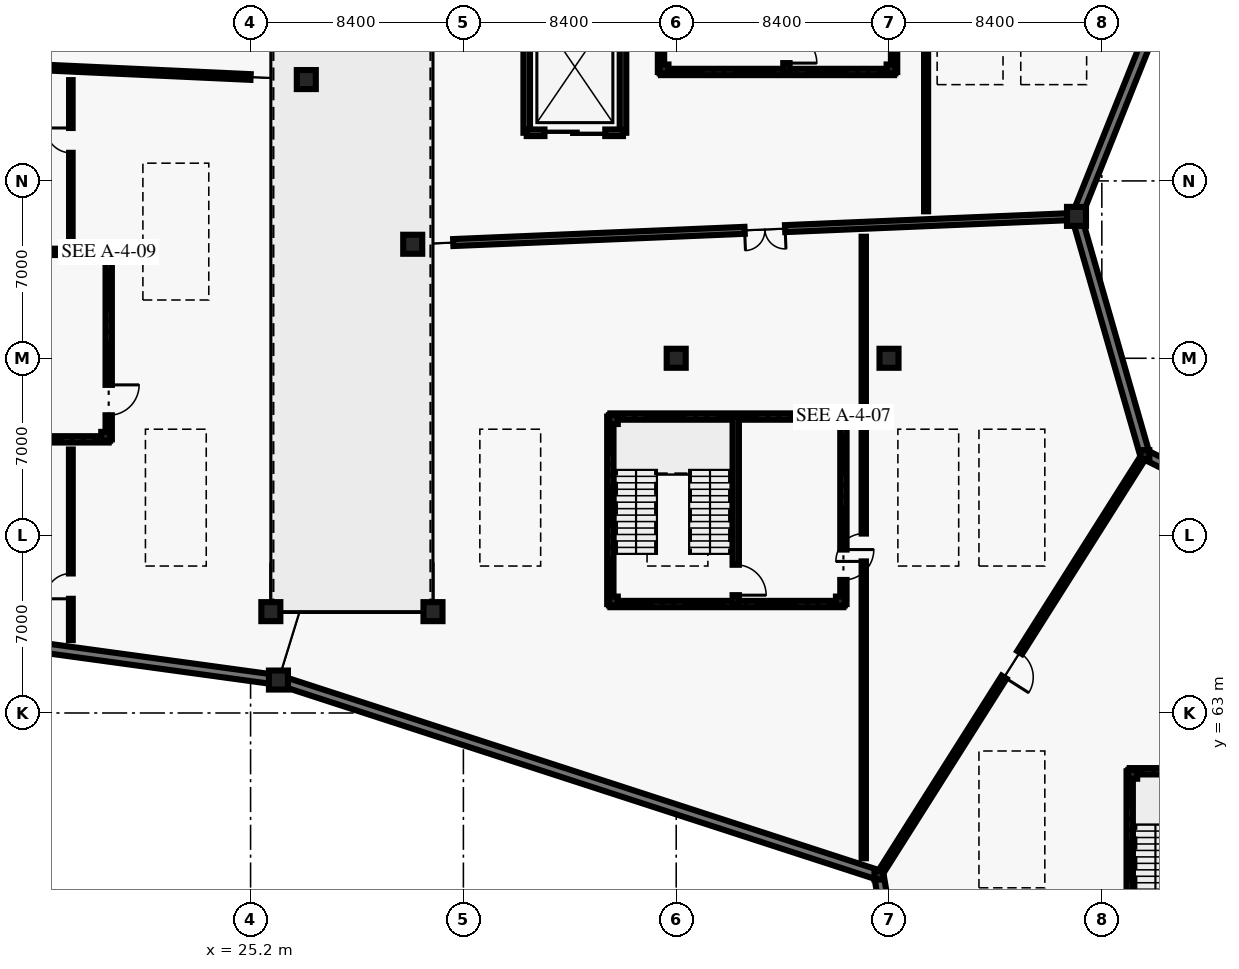
"""IFC4 building model, lengths in metres.
Left out: names, types, materials, properties, quantities, classifications, styles, units other than length and angle.
Written with IfcOpenShell. Run it as: python <this file> out.ifc"""

import sys

from ifc_helpers import new_model, si_unit, direction, frame, frame_2d, origin, origin_2d, place, context, subcontext, project, spatial, rectangle, i_section, extrude, element, fill, save


model = new_model("IFC4")
c1 = context("Model", 3, precision=1e-05, world=origin(), true_north=direction((0.0, 1.0)))
c2 = subcontext(c1, "Body", "Model", "MODEL_VIEW")
j1 = project(units=[si_unit("LENGTHUNIT", "METRE"), si_unit("PLANEANGLEUNIT", "RADIAN")], contexts=[c1])
p1 = place(None, origin())
s1 = spatial("IfcSite", under=j1, at=p1, CompositionType="ELEMENT")
p2 = place(p1, origin())
s2 = spatial("IfcBuilding", under=s1, at=p2, CompositionType="ELEMENT")
p3 = place(p2, frame((0.0, 0.0, -4.5)))
s3 = spatial("IfcBuildingStorey", under=s2, at=p3, CompositionType="ELEMENT", Elevation=-4.5)
for number, where, z_axis, x_axis in (
    (1, (26.3, 64.3, 0.0), (0.0, 0.0, 1.0), (1.0, 0.0, 0.0)),
    (2, (27.4, 88.0, 0.0), (0.0, 0.0, 1.0), (1.0, 0.0, 0.0)),
    (3, (31.6, 81.5, 0.0), (0.0, 0.0, 1.0), (1.0, 0.0, 0.0)),
):
    element("IfcColumn", number, at=place(p3, frame(where, z_axis=z_axis, x_axis=x_axis)), inside=s3, PredefinedType="COLUMN", context=c2, shape_type="SweptSolid", body=[
        extrude(rectangle(XDim=0.75, YDim=0.75, at=origin_2d()), origin(), (0.0, 0.0, 1.0), 4.5),
    ])
p4 = place(p3, frame((50.0, 56.6, 0.0), z_axis=(0.0, 0.0, 1.0), x_axis=(1.0, 0.0, 0.0)))
e4 = element("IfcColumn", 4, at=p4, inside=s3, PredefinedType="COLUMN", context=c2, shape_type="SweptSolid", body=[
    extrude(i_section(OverallWidth=0.35, OverallDepth=0.35, WebThickness=0.02, FlangeThickness=0.028, at=origin_2d()), origin(), (0.0, 0.0, 1.0), 4.5),
])
p5 = place(p3, frame((57.8, 82.6, 0.0), z_axis=(0.0, 0.0, 1.0), x_axis=(1.0, 0.0, 0.0)))
e5 = element("IfcColumn", 5, at=p5, inside=s3, PredefinedType="COLUMN", context=c2, shape_type="SweptSolid", body=[
    extrude(rectangle(XDim=0.75, YDim=0.75, at=origin_2d()), origin(), (0.0, 0.0, 1.0), 4.5),
])
p6 = place(p3, frame((60.5, 73.2, 0.0), z_axis=(0.0, 0.0, 1.0), x_axis=(1.0, 0.0, 0.0)))
e6 = element("IfcColumn", 6, at=p6, inside=s3, PredefinedType="COLUMN", context=c2, shape_type="SweptSolid", body=[
    extrude(i_section(OverallWidth=0.35, OverallDepth=0.35, WebThickness=0.02, FlangeThickness=0.028, at=origin_2d()), origin(), (0.0, 0.0, 1.0), 4.5),
])
for number, where, z_axis, x_axis in (
    (7, (42.0, 77.0, 0.0), (0.0, 0.0, 1.0), (1.0, 0.0, 0.0)),
    (8, (50.4, 77.0, 0.0), (0.0, 0.0, 1.0), (1.0, 0.0, 0.0)),
    (9, (26.0, 67.0, 0.0), (0.0, 0.0, 1.0), (1.0, 0.0, 0.0)),
    (10, (32.4, 67.0, 0.0), (0.0, 0.0, 1.0), (1.0, 0.0, 0.0)),
):
    element("IfcColumn", number, at=place(p3, frame(where, z_axis=z_axis, x_axis=x_axis)), inside=s3, PredefinedType="COLUMN", context=c2, shape_type="SweptSolid", body=[
        extrude(rectangle(XDim=0.75, YDim=0.75, at=origin_2d()), origin(), (0.0, 0.0, 1.0), 4.5),
    ])
for number, where, z_axis, x_axis in (
    (11, (60.02, 60.58, 0.0), (0.0, 0.0, 1.0), (1.0, 0.0, 0.0)),
    (12, (39.52, 67.42, 0.0), (0.0, 0.0, 1.0), (1.0, 0.0, 0.0)),
    (13, (48.48, 67.42, 0.0), (0.0, 0.0, 1.0), (1.0, 0.0, 0.0)),
    (14, (48.48, 74.58, 0.0), (0.0, 0.0, 1.0), (1.0, 0.0, 0.0)),
    (15, (39.52, 74.58, 0.0), (0.0, 0.0, 1.0), (1.0, 0.0, 0.0)),
    (16, (19.48, 73.92, 0.0), (0.0, 0.0, 1.0), (1.0, 0.0, 0.0)),
    (17, (19.48, 81.08, 0.0), (0.0, 0.0, 1.0), (1.0, 0.0, 0.0)),
    (18, (41.52, 88.42, 0.0), (0.0, 0.0, 1.0), (1.0, 0.0, 0.0)),
    (19, (50.48, 88.42, 0.0), (0.0, 0.0, 1.0), (1.0, 0.0, 0.0)),
):
    element("IfcColumn", number, at=place(p3, frame(where, z_axis=z_axis, x_axis=x_axis)), inside=s3, PredefinedType="COLUMN", context=c2, shape_type="SweptSolid", body=[
        extrude(i_section(OverallWidth=0.35, OverallDepth=0.35, WebThickness=0.02, FlangeThickness=0.028, at=origin_2d()), origin(), (0.0, 0.0, 1.0), 4.5),
    ])
p7 = place(p3, frame((50.008, 56.551, 0.0), z_axis=(0.0, 0.0, 1.0), x_axis=(0.164415392621, -0.986391189473, 0.0)))
e20 = element("IfcWall", 20, at=p7, inside=s3, PredefinedType="USERDEFINED", context=c2, shape_type="SweptSolid", body=[
    extrude(rectangle(XDim=12.066, YDim=0.38, at=frame_2d((6.033, 0.0))), origin(), (0.0, 0.0, 1.0), 4.14),
])
p8 = place(p3, frame((74.8, 66.1, 0.0), z_axis=(0.0, 0.0, 1.0), x_axis=(-0.895672359878, 0.44471454187, 0.0)))
e21 = element("IfcWall", 21, at=p8, inside=s3, PredefinedType="USERDEFINED", context=c2, shape_type="SweptSolid", body=[
    extrude(rectangle(XDim=15.916, YDim=0.38, at=frame_2d((7.958, 0.0))), origin(), (0.0, 0.0, 1.0), 4.14),
])
p9 = place(p3, frame((60.486, 73.248, 0.0), z_axis=(0.0, 0.0, 1.0), x_axis=(-0.27604330243, 0.961145199844, 0.0)))
e22 = element("IfcWall", 22, at=p9, inside=s3, PredefinedType="USERDEFINED", context=c2, shape_type="SweptSolid", body=[
    extrude(rectangle(XDim=9.68, YDim=0.38, at=frame_2d((4.84, 0.0))), origin(), (0.0, 0.0, 1.0), 4.14),
])
p10 = place(p3, frame((26.348, 64.285, 0.0), z_axis=(0.0, 0.0, 1.0), x_axis=(0.951054162367, -0.309024238927, 0.0)))
e23 = element("IfcWall", 23, at=p10, inside=s3, PredefinedType="USERDEFINED", context=c2, shape_type="SweptSolid", body=[
    extrude(rectangle(XDim=24.82, YDim=0.38, at=frame_2d((12.41, 0.0))), origin(), (0.0, 0.0, 1.0), 4.14),
])
p11 = place(p3, frame((57.819, 82.646, 0.0), z_axis=(0.0, 0.0, 1.0), x_axis=(0.371332668442, 0.928499891948, 0.0)))
e24 = element("IfcWall", 24, at=p11, inside=s3, PredefinedType="USERDEFINED", context=c2, shape_type="SweptSolid", body=[
    extrude(rectangle(XDim=12.336, YDim=0.38, at=frame_2d((6.168, 0.0))), origin(), (0.0, 0.0, 1.0), 4.14),
])
p12 = place(p3, frame((0.0, 67.9, 0.0), z_axis=(0.0, 0.0, 1.0), x_axis=(0.990762647393, -0.135607435379, 0.0)))
e25 = element("IfcWall", 25, at=p12, inside=s3, PredefinedType="USERDEFINED", context=c2, shape_type="SweptSolid", body=[
    extrude(rectangle(XDim=26.496, YDim=0.38, at=frame_2d((13.248, 0.0))), origin(), (0.0, 0.0, 1.0), 4.14),
])
p13 = place(p3, frame((60.5, 73.2, 0.0), z_axis=(0.0, 0.0, 1.0), x_axis=(-0.534570878454, -0.845123645338, 0.0)))
e26 = element("IfcWall", 26, at=p13, inside=s3, PredefinedType="SOLIDWALL", context=c2, shape_type="SweptSolid", body=[
    extrude(rectangle(XDim=19.642, YDim=0.225, at=frame_2d((9.821, 0.0))), origin(), (0.0, 0.0, 1.0), 4.14),
])
p14 = place(p13, frame((9.246, 0.0, 0.0)))
e27 = element("IfcOpeningElement", 27, at=p14, cuts=e26, PredefinedType="OPENING", context=c2, shape_type="SweptSolid", body=[
    extrude(rectangle(XDim=1.15, YDim=2.2, at=frame_2d((0.575, 1.1))), frame((0.0, 0.123, 0.0), z_axis=(0.0, -1.0, 0.0), x_axis=(1.0, 0.0, 0.0)), (0.0, 0.0, 1.0), 0.245),
])
p15 = place(p3, frame((57.8, 82.6, 0.0), z_axis=(0.0, 0.0, 1.0), x_axis=(-0.999119166836, -0.041962965345, 0.0)))
e28 = element("IfcWall", 28, at=p15, inside=s3, PredefinedType="SOLIDWALL", context=c2, shape_type="SweptSolid", body=[
    extrude(rectangle(XDim=24.622, YDim=0.275, at=frame_2d((12.311, 0.0))), origin(), (0.0, 0.0, 1.0), 4.14),
])
p16 = place(p15, frame((11.511, 0.0, 0.0)))
e29 = element("IfcOpeningElement", 29, at=p16, cuts=e28, PredefinedType="OPENING", context=c2, shape_type="SweptSolid", body=[
    extrude(rectangle(XDim=1.6, YDim=2.45, at=frame_2d((0.8, 1.225))), frame((0.0, 0.147, 0.0), z_axis=(0.0, -1.0, 0.0), x_axis=(1.0, 0.0, 0.0)), (0.0, 0.0, 1.0), 0.295),
])
p17 = place(p3, frame((25.2, 88.101, 0.0), z_axis=(0.0, 0.0, 1.0), x_axis=(-0.998939142773, 0.046049853812, 0.0)))
e30 = element("IfcWall", 30, at=p17, inside=s3, PredefinedType="SOLIDWALL", context=c2, shape_type="SweptSolid", body=[
    extrude(rectangle(XDim=19.521, YDim=0.225, at=frame_2d((9.76, 0.0))), origin(), (0.0, 0.0, 1.0), 4.14),
])
p18 = place(p17, frame((9.185, 0.0, 0.0)))
e31 = element("IfcOpeningElement", 31, at=p18, cuts=e30, PredefinedType="OPENING", context=c2, shape_type="SweptSolid", body=[
    extrude(rectangle(XDim=1.15, YDim=2.2, at=frame_2d((0.575, 1.1))), frame((0.0, 0.123, 0.0), z_axis=(0.0, -1.0, 0.0), x_axis=(1.0, 0.0, 0.0)), (0.0, 0.0, 1.0), 0.245),
])
p19 = place(p3, frame((49.403, 57.267, 0.0), z_axis=(0.0, 0.0, 1.0), x_axis=(0.0, 1.0, 0.0)))
e32 = element("IfcWall", 32, at=p19, inside=s3, PredefinedType="PARTITIONING", context=c2, shape_type="SweptSolid", body=[
    extrude(rectangle(XDim=24.53, YDim=0.17, at=frame_2d((12.265, 0.0))), origin(), (0.0, 0.0, 1.0), 3.02),
])
p20 = place(p19, frame((11.715, 0.0, 0.0)))
e33 = element("IfcOpeningElement", 33, at=p20, cuts=e32, PredefinedType="OPENING", context=c2, shape_type="SweptSolid", body=[
    extrude(rectangle(XDim=1.1, YDim=2.2, at=frame_2d((0.55, 1.1))), frame((0.0, 0.095, 0.0), z_axis=(0.0, -1.0, 0.0), x_axis=(1.0, 0.0, 0.0)), (0.0, 0.0, 1.0), 0.19),
])
p21 = place(p3, frame((51.864, 82.801, 0.0), z_axis=(0.0, 0.0, 1.0), x_axis=(0.0, 1.0, 0.0)))
e34 = element("IfcWall", 34, at=p21, inside=s3, PredefinedType="PARTITIONING", context=c2, shape_type="SweptSolid", body=[
    extrude(rectangle(XDim=19.121, YDim=0.16, at=frame_2d((9.561, 0.0))), origin(), (0.0, 0.0, 1.0), 3.02),
])
p22 = place(p21, frame((9.035, 0.0, 0.0)))
e35 = element("IfcOpeningElement", 35, at=p22, cuts=e34, PredefinedType="OPENING", context=c2, shape_type="SweptSolid", body=[
    extrude(rectangle(XDim=1.05, YDim=2.2, at=frame_2d((0.525, 1.1))), frame((0.0, 0.09, 0.0), z_axis=(0.0, -1.0, 0.0), x_axis=(1.0, 0.0, 0.0)), (0.0, 0.0, 1.0), 0.18),
])
p23 = place(p3, frame((18.106, 65.876, 0.0), z_axis=(0.0, 0.0, 1.0), x_axis=(0.0, 1.0, 0.0)))
e36 = element("IfcWall", 36, at=p23, inside=s3, PredefinedType="PARTITIONING", context=c2, shape_type="SweptSolid", body=[
    extrude(rectangle(XDim=7.524, YDim=0.15, at=frame_2d((3.762, 0.0))), origin(), (0.0, 0.0, 1.0), 3.02),
])
p24 = place(p23, frame((1.631, 0.0, 0.0)))
e37 = element("IfcOpeningElement", 37, at=p24, cuts=e36, PredefinedType="OPENING", context=c2, shape_type="SweptSolid", body=[
    extrude(rectangle(XDim=1.0, YDim=2.15, at=frame_2d((0.5, 1.075))), frame((0.0, 0.085, 0.0), z_axis=(0.0, -1.0, 0.0), x_axis=(1.0, 0.0, 0.0)), (0.0, 0.0, 1.0), 0.17),
])
p25 = place(p3, frame((18.106, 81.6, 0.0), z_axis=(0.0, 0.0, 1.0), x_axis=(0.0, 1.0, 0.0)))
e38 = element("IfcWall", 38, at=p25, inside=s3, PredefinedType="PARTITIONING", context=c2, shape_type="SweptSolid", body=[
    extrude(rectangle(XDim=6.378, YDim=0.14, at=frame_2d((3.189, 0.0))), origin(), (0.0, 0.0, 1.0), 3.02),
])
p26 = place(p25, frame((3.509, 0.0, 0.0)))
e39 = element("IfcOpeningElement", 39, at=p26, cuts=e38, PredefinedType="OPENING", context=c2, shape_type="SweptSolid", body=[
    extrude(rectangle(XDim=0.98, YDim=2.15, at=frame_2d((0.49, 1.075))), frame((0.0, 0.08, 0.0), z_axis=(0.0, -1.0, 0.0), x_axis=(1.0, 0.0, 0.0)), (0.0, 0.0, 1.0), 0.16),
])
p27 = place(p3, frame((59.9, 53.3, 0.0), z_axis=(0.0, 0.0, 1.0), x_axis=(0.0, 1.0, 0.0)))
e40 = element("IfcWall", 40, at=p27, inside=s3, PredefinedType="SHEAR", context=c2, shape_type="SweptSolid", body=[
    extrude(rectangle(XDim=7.4, YDim=0.25, at=frame_2d((3.7, 0.0))), origin(), (0.0, 0.0, 1.0), 4.14),
])
p28 = place(p3, frame((59.9, 60.7, 0.0), z_axis=(0.0, 0.0, 1.0), x_axis=(1.0, 0.0, 0.0)))
e41 = element("IfcWall", 41, at=p28, inside=s3, PredefinedType="SHEAR", context=c2, shape_type="SweptSolid", body=[
    extrude(rectangle(XDim=9.2, YDim=0.25, at=frame_2d((4.6, 0.0))), origin(), (0.0, 0.0, 1.0), 4.14),
])
p29 = place(p3, frame((39.4, 67.3, 0.0), z_axis=(0.0, 0.0, 1.0), x_axis=(0.0, 1.0, 0.0)))
e42 = element("IfcWall", 42, at=p29, inside=s3, PredefinedType="SHEAR", context=c2, shape_type="SweptSolid", body=[
    extrude(rectangle(XDim=7.4, YDim=0.25, at=frame_2d((3.7, 0.0))), origin(), (0.0, 0.0, 1.0), 4.14),
])
for number, where, z_axis, x_axis in (
    (43, (39.4, 74.7, 0.0), (0.0, 0.0, 1.0), (1.0, 0.0, 0.0)),
    (44, (48.6, 67.3, 0.0), (0.0, 0.0, 1.0), (-1.0, 0.0, 0.0)),
):
    element("IfcWall", number, at=place(p3, frame(where, z_axis=z_axis, x_axis=x_axis)), inside=s3, PredefinedType="SHEAR", context=c2, shape_type="SweptSolid", body=[
        extrude(rectangle(XDim=9.2, YDim=0.25, at=frame_2d((4.6, 0.0))), origin(), (0.0, 0.0, 1.0), 4.14),
    ])
p30 = place(p3, frame((48.6, 74.7, 0.0), z_axis=(0.0, 0.0, 1.0), x_axis=(0.0, -1.0, 0.0)))
e45 = element("IfcWall", 45, at=p30, inside=s3, PredefinedType="SHEAR", context=c2, shape_type="SweptSolid", body=[
    extrude(rectangle(XDim=7.4, YDim=0.25, at=frame_2d((3.7, 0.0))), origin(), (0.0, 0.0, 1.0), 4.14),
])
p31 = place(p30, frame((5.25, 0.0, 0.0)))
e46 = element("IfcOpeningElement", 46, at=p31, cuts=e45, PredefinedType="OPENING", context=c2, shape_type="SweptSolid", body=[
    extrude(rectangle(XDim=1.2, YDim=2.2, at=frame_2d((0.6, 1.1))), frame((0.0, 0.135, 0.0), z_axis=(0.0, -1.0, 0.0), x_axis=(1.0, 0.0, 0.0)), (0.0, 0.0, 1.0), 0.27),
])
p32 = place(p3, frame((44.35, 74.7, 0.0), z_axis=(0.0, 0.0, 1.0), x_axis=(0.0, -1.0, 0.0)))
e47 = element("IfcWall", 47, at=p32, inside=s3, PredefinedType="SHEAR", context=c2, shape_type="SweptSolid", body=[
    extrude(rectangle(XDim=7.4, YDim=0.25, at=frame_2d((3.7, 0.0))), origin(), (0.0, 0.0, 1.0), 4.14),
])
p33 = place(p32, frame((5.85, 0.0, 0.0)))
e48 = element("IfcOpeningElement", 48, at=p33, cuts=e47, PredefinedType="OPENING", context=c2, shape_type="SweptSolid", body=[
    extrude(rectangle(XDim=1.2, YDim=2.2, at=frame_2d((0.6, 1.1))), frame((0.0, 0.135, 0.0), z_axis=(0.0, -1.0, 0.0), x_axis=(1.0, 0.0, 0.0)), (0.0, 0.0, 1.0), 0.27),
])
for number, where, z_axis, x_axis in (
    (49, (10.4, 81.2, 0.0), (0.0, 0.0, 1.0), (1.0, 0.0, 0.0)),
    (50, (19.6, 73.8, 0.0), (0.0, 0.0, 1.0), (-1.0, 0.0, 0.0)),
):
    element("IfcWall", number, at=place(p3, frame(where, z_axis=z_axis, x_axis=x_axis)), inside=s3, PredefinedType="SHEAR", context=c2, shape_type="SweptSolid", body=[
        extrude(rectangle(XDim=9.2, YDim=0.25, at=frame_2d((4.6, 0.0))), origin(), (0.0, 0.0, 1.0), 4.14),
    ])
p34 = place(p3, frame((19.6, 81.2, 0.0), z_axis=(0.0, 0.0, 1.0), x_axis=(0.0, -1.0, 0.0)))
e51 = element("IfcWall", 51, at=p34, inside=s3, PredefinedType="SHEAR", context=c2, shape_type="SweptSolid", body=[
    extrude(rectangle(XDim=7.4, YDim=0.25, at=frame_2d((3.7, 0.0))), origin(), (0.0, 0.0, 1.0), 4.14),
])
p35 = place(p34, frame((5.25, 0.0, 0.0)))
e52 = element("IfcOpeningElement", 52, at=p35, cuts=e51, PredefinedType="OPENING", context=c2, shape_type="SweptSolid", body=[
    extrude(rectangle(XDim=1.2, YDim=2.2, at=frame_2d((0.6, 1.1))), frame((0.0, 0.135, 0.0), z_axis=(0.0, -1.0, 0.0), x_axis=(1.0, 0.0, 0.0)), (0.0, 0.0, 1.0), 0.27),
])
p36 = place(p3, frame((41.4, 88.3, 0.0), z_axis=(0.0, 0.0, 1.0), x_axis=(0.0, 1.0, 0.0)))
e53 = element("IfcWall", 53, at=p36, inside=s3, PredefinedType="SHEAR", context=c2, shape_type="SweptSolid", body=[
    extrude(rectangle(XDim=7.4, YDim=0.25, at=frame_2d((3.7, 0.0))), origin(), (0.0, 0.0, 1.0), 4.14),
])
p37 = place(p3, frame((50.6, 88.3, 0.0), z_axis=(0.0, 0.0, 1.0), x_axis=(-1.0, 0.0, 0.0)))
e54 = element("IfcWall", 54, at=p37, inside=s3, PredefinedType="SHEAR", context=c2, shape_type="SweptSolid", body=[
    extrude(rectangle(XDim=9.2, YDim=0.25, at=frame_2d((4.6, 0.0))), origin(), (0.0, 0.0, 1.0), 4.14),
])
p38 = place(p3, frame((50.6, 95.7, 0.0), z_axis=(0.0, 0.0, 1.0), x_axis=(0.0, -1.0, 0.0)))
e55 = element("IfcWall", 55, at=p38, inside=s3, PredefinedType="SHEAR", context=c2, shape_type="SweptSolid", body=[
    extrude(rectangle(XDim=7.4, YDim=0.25, at=frame_2d((3.7, 0.0))), origin(), (0.0, 0.0, 1.0), 4.14),
])
p39 = place(p38, frame((5.25, 0.0, 0.0)))
e56 = element("IfcOpeningElement", 56, at=p39, cuts=e55, PredefinedType="OPENING", context=c2, shape_type="SweptSolid", body=[
    extrude(rectangle(XDim=1.2, YDim=2.2, at=frame_2d((0.6, 1.1))), frame((0.0, 0.135, 0.0), z_axis=(0.0, -1.0, 0.0), x_axis=(1.0, 0.0, 0.0)), (0.0, 0.0, 1.0), 0.27),
])
p40 = place(p3, frame((46.35, 95.7, 0.0), z_axis=(0.0, 0.0, 1.0), x_axis=(0.0, -1.0, 0.0)))
e57 = element("IfcWall", 57, at=p40, inside=s3, PredefinedType="SHEAR", context=c2, shape_type="SweptSolid", body=[
    extrude(rectangle(XDim=7.4, YDim=0.25, at=frame_2d((3.7, 0.0))), origin(), (0.0, 0.0, 1.0), 4.14),
])
p41 = place(p40, frame((5.85, 0.0, 0.0)))
e58 = element("IfcOpeningElement", 58, at=p41, cuts=e57, PredefinedType="OPENING", context=c2, shape_type="SweptSolid", body=[
    extrude(rectangle(XDim=1.2, YDim=2.2, at=frame_2d((0.6, 1.1))), frame((0.0, 0.135, 0.0), z_axis=(0.0, -1.0, 0.0), x_axis=(1.0, 0.0, 0.0)), (0.0, 0.0, 1.0), 0.27),
])
for number, where, z_axis, x_axis in (
    (59, (39.9, 91.1, 0.0), (0.0, 0.0, 1.0), (0.0, -1.0, 0.0)),
    (60, (36.1, 85.9, 0.0), (0.0, 0.0, 1.0), (0.0, 1.0, 0.0)),
):
    element("IfcWall", number, at=place(p3, frame(where, z_axis=z_axis, x_axis=x_axis)), inside=s3, PredefinedType="SHEAR", context=c2, shape_type="SweptSolid", body=[
        extrude(rectangle(XDim=5.2, YDim=0.26, at=frame_2d((2.6, 0.0))), origin(), (0.0, 0.0, 1.0), 4.26),
    ])
p42 = place(p3, frame((39.9, 85.9, 0.0), z_axis=(0.0, 0.0, 1.0), x_axis=(-1.0, 0.0, 0.0)))
e61 = element("IfcWall", 61, at=p42, inside=s3, PredefinedType="SHEAR", context=c2, shape_type="SweptSolid", body=[
    extrude(rectangle(XDim=3.8, YDim=0.26, at=frame_2d((1.9, 0.0))), origin(), (0.0, 0.0, 1.0), 4.26),
])
p43 = place(p42, frame((0.7, 0.0, 0.0)))
e62 = element("IfcOpeningElement", 62, at=p43, cuts=e61, PredefinedType="OPENING", context=c2, shape_type="SweptSolid", body=[
    extrude(rectangle(XDim=2.4, YDim=2.85, at=frame_2d((1.2, 1.425))), frame((0.0, 0.14, 0.0), z_axis=(0.0, -1.0, 0.0), x_axis=(1.0, 0.0, 0.0)), (0.0, 0.0, 1.0), 0.28),
])
p44 = place(p14, origin())
e63 = element("IfcDoor", 63, at=p44, inside=s3, OperationType="SINGLE_SWING_RIGHT", PredefinedType="DOOR", context=c2, shape_type="SweptSolid", body=[
    extrude(rectangle(XDim=1.15, YDim=2.2, at=frame_2d((0.575, 1.1))), frame((0.0, 0.025, 0.0), z_axis=(0.0, -1.0, 0.0), x_axis=(1.0, 0.0, 0.0)), (0.0, 0.0, 1.0), 0.05),
])
fill(e27, e63)
p45 = place(p16, origin())
e64 = element("IfcDoor", 64, at=p45, inside=s3, OperationType="DOUBLE_DOOR_SINGLE_SWING", PredefinedType="DOOR", context=c2, shape_type="SweptSolid", body=[
    extrude(rectangle(XDim=1.6, YDim=2.45, at=frame_2d((0.8, 1.225))), frame((0.0, 0.025, 0.0), z_axis=(0.0, -1.0, 0.0), x_axis=(1.0, 0.0, 0.0)), (0.0, 0.0, 1.0), 0.05),
])
fill(e29, e64)
p46 = place(p20, origin())
e65 = element("IfcDoor", 65, at=p46, inside=s3, OperationType="SINGLE_SWING_LEFT", PredefinedType="DOOR", context=c2, shape_type="SweptSolid", body=[
    extrude(rectangle(XDim=1.1, YDim=2.2, at=frame_2d((0.55, 1.1))), frame((0.0, 0.025, 0.0), z_axis=(0.0, -1.0, 0.0), x_axis=(1.0, 0.0, 0.0)), (0.0, 0.0, 1.0), 0.05),
])
fill(e33, e65)
p47 = place(p24, origin())
e66 = element("IfcDoor", 66, at=p47, inside=s3, OperationType="SINGLE_SWING_LEFT", PredefinedType="DOOR", context=c2, shape_type="SweptSolid", body=[
    extrude(rectangle(XDim=1.0, YDim=2.15, at=frame_2d((0.5, 1.075))), frame((0.0, 0.025, 0.0), z_axis=(0.0, -1.0, 0.0), x_axis=(1.0, 0.0, 0.0)), (0.0, 0.0, 1.0), 0.05),
])
fill(e37, e66)
p48 = place(p26, origin())
e67 = element("IfcDoor", 67, at=p48, inside=s3, OperationType="SINGLE_SWING_RIGHT", PredefinedType="DOOR", context=c2, shape_type="SweptSolid", body=[
    extrude(rectangle(XDim=0.98, YDim=2.15, at=frame_2d((0.49, 1.075))), frame((0.0, 0.025, 0.0), z_axis=(0.0, -1.0, 0.0), x_axis=(1.0, 0.0, 0.0)), (0.0, 0.0, 1.0), 0.05),
])
fill(e39, e67)
p49 = place(p31, origin())
e68 = element("IfcDoor", 68, at=p49, inside=s3, OperationType="SINGLE_SWING_LEFT", PredefinedType="DOOR", context=c2, shape_type="SweptSolid", body=[
    extrude(rectangle(XDim=1.2, YDim=2.2, at=frame_2d((0.6, 1.1))), frame((0.0, 0.025, 0.0), z_axis=(0.0, -1.0, 0.0), x_axis=(1.0, 0.0, 0.0)), (0.0, 0.0, 1.0), 0.05),
])
fill(e46, e68)
p50 = place(p33, origin())
e69 = element("IfcDoor", 69, at=p50, inside=s3, OperationType="SINGLE_SWING_RIGHT", PredefinedType="DOOR", context=c2, shape_type="SweptSolid", body=[
    extrude(rectangle(XDim=1.2, YDim=2.2, at=frame_2d((0.6, 1.1))), frame((0.0, 0.025, 0.0), z_axis=(0.0, -1.0, 0.0), x_axis=(1.0, 0.0, 0.0)), (0.0, 0.0, 1.0), 0.05),
])
fill(e48, e69)
p51 = place(p35, origin())
e70 = element("IfcDoor", 70, at=p51, inside=s3, OperationType="SINGLE_SWING_LEFT", PredefinedType="DOOR", context=c2, shape_type="SweptSolid", body=[
    extrude(rectangle(XDim=1.2, YDim=2.2, at=frame_2d((0.6, 1.1))), frame((0.0, 0.025, 0.0), z_axis=(0.0, -1.0, 0.0), x_axis=(1.0, 0.0, 0.0)), (0.0, 0.0, 1.0), 0.05),
])
fill(e52, e70)
p52 = place(p41, origin())
e71 = element("IfcDoor", 71, at=p52, inside=s3, OperationType="SINGLE_SWING_RIGHT", PredefinedType="DOOR", context=c2, shape_type="SweptSolid", body=[
    extrude(rectangle(XDim=1.2, YDim=2.2, at=frame_2d((0.6, 1.1))), frame((0.0, 0.025, 0.0), z_axis=(0.0, -1.0, 0.0), x_axis=(1.0, 0.0, 0.0)), (0.0, 0.0, 1.0), 0.05),
])
fill(e58, e71)
p53 = place(p43, origin())
e72 = element("IfcDoor", 72, at=p53, inside=s3, OperationType="SLIDING_TO_LEFT", PredefinedType="DOOR", context=c2, shape_type="SweptSolid", body=[
    extrude(rectangle(XDim=2.4, YDim=2.85, at=frame_2d((1.2, 1.425))), frame((0.0, 0.025, 0.0), z_axis=(0.0, -1.0, 0.0), x_axis=(1.0, 0.0, 0.0)), (0.0, 0.0, 1.0), 0.05),
])
fill(e62, e72)
save(model, sys.argv[1])
